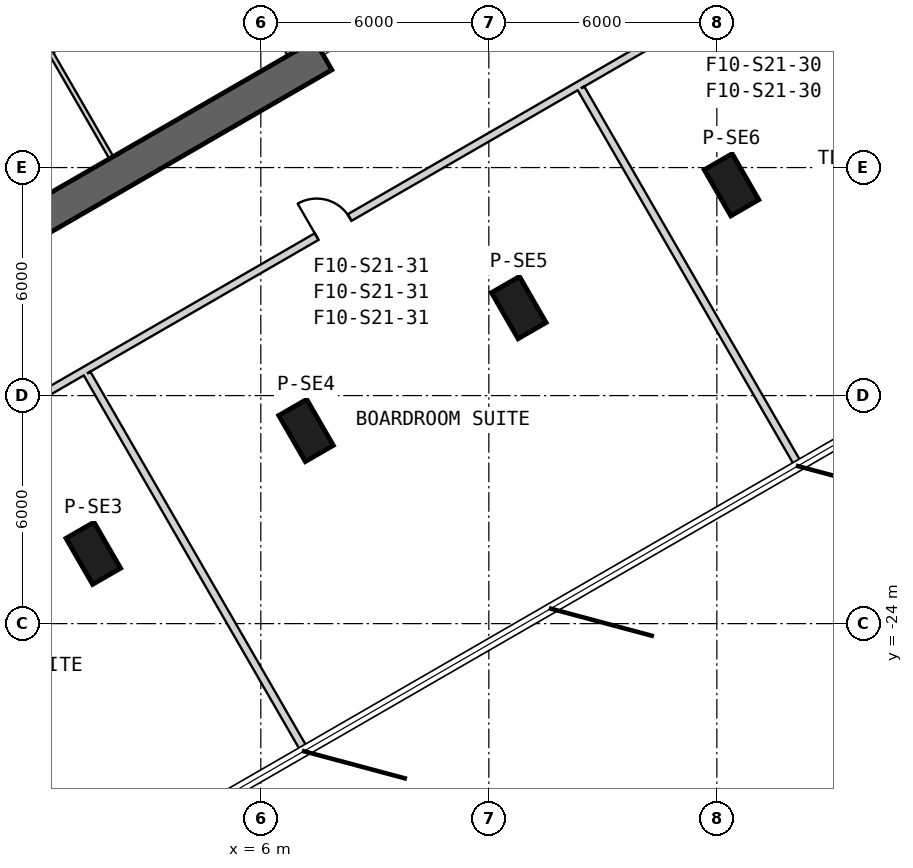
"""IFC4 building model, lengths in metres.
Left out: names, types, materials, properties, quantities, classifications, styles, units other than length and angle.
Written with IfcOpenShell. Run it as: python <this file> out.ifc"""

import sys

from ifc_helpers import new_model, si_unit, direction, frame, frame_2d, origin, origin_2d, place, context, subcontext, project, spatial, rectangle, extrude, element, fill, save


model = new_model("IFC4")
c1 = context("Model", 3, precision=1e-05, world=origin(), true_north=direction((0.0, 1.0)))
c2 = subcontext(c1, "Body", "Model", "MODEL_VIEW")
j1 = project(units=[si_unit("LENGTHUNIT", "METRE"), si_unit("PLANEANGLEUNIT", "RADIAN")], contexts=[c1])
p1 = place(None, origin())
s1 = spatial("IfcSite", under=j1, at=p1, CompositionType="ELEMENT")
p2 = place(p1, origin())
s2 = spatial("IfcBuilding", under=s1, at=p2, CompositionType="ELEMENT")
p3 = place(p2, frame((0.0, 0.0, 333.8)))
s3 = spatial("IfcBuildingStorey", under=s2, at=p3, CompositionType="ELEMENT", Elevation=333.8)
for number, where, z_axis, x_axis in (
    (1, (1.592, -22.149, 0.0), (0.0, 0.0, 1.0), (0.5, -0.866, 0.0)),
    (2, (7.19, -18.917, 0.0), (0.0, 0.0, 1.0), (0.5, -0.866, 0.0)),
    (3, (12.788, -15.685, 0.0), (0.0, 0.0, 1.0), (0.5, -0.866, 0.0)),
    (4, (18.386, -12.453, 0.0), (0.0, 0.0, 1.0), (0.5, -0.866, 0.0)),
):
    element("IfcColumn", number, at=place(p3, frame(where, z_axis=z_axis, x_axis=x_axis)), inside=s3, PredefinedType="COLUMN", context=c2, shape_type="SweptSolid", body=[
        extrude(rectangle(XDim=1.4, YDim=0.85, at=origin_2d()), origin(), (0.0, 0.0, 1.0), 3.9),
    ])
p4 = place(p3, frame((-7.825, -17.97, 0.0), z_axis=(0.0, 0.0, 1.0), x_axis=(0.866028369851, 0.499994862586, 0.0)))
e5 = element("IfcWall", 5, at=p4, inside=s3, PredefinedType="SHEAR", context=c2, shape_type="SweptSolid", body=[
    extrude(rectangle(XDim=31.523, YDim=0.9, at=frame_2d((15.762, 0.0))), origin(), (0.0, 0.0, 1.0), 3.9),
])
p5 = place(p4, frame((17.862, 0.0, 0.0)))
e6 = element("IfcOpeningElement", 6, at=p5, cuts=e5, PredefinedType="OPENING", context=c2, shape_type="SweptSolid", body=[
    extrude(rectangle(XDim=1.2, YDim=2.4, at=frame_2d((0.6, 1.2))), frame((0.0, 0.46, 0.0), z_axis=(0.0, -1.0, 0.0), x_axis=(1.0, 0.0, 0.0)), (0.0, 0.0, 1.0), 0.92),
])
p6 = place(p4, frame((20.562, 0.0, 0.0)))
e7 = element("IfcOpeningElement", 7, at=p6, cuts=e5, PredefinedType="OPENING", context=c2, shape_type="SweptSolid", body=[
    extrude(rectangle(XDim=1.2, YDim=2.4, at=frame_2d((0.6, 1.2))), frame((0.0, 0.46, 0.0), z_axis=(0.0, -1.0, 0.0), x_axis=(1.0, 0.0, 0.0)), (0.0, 0.0, 1.0), 0.92),
])
p7 = place(p4, frame((26.712, 0.0, 0.0)))
e8 = element("IfcOpeningElement", 8, at=p7, cuts=e5, PredefinedType="OPENING", context=c2, shape_type="SweptSolid", body=[
    extrude(rectangle(XDim=1.2, YDim=2.4, at=frame_2d((0.6, 1.2))), frame((0.0, 0.46, 0.0), z_axis=(0.0, -1.0, 0.0), x_axis=(1.0, 0.0, 0.0)), (0.0, 0.0, 1.0), 0.92),
])
p8 = place(p4, frame((3.612, 0.0, 0.0)))
e9 = element("IfcOpeningElement", 9, at=p8, cuts=e5, PredefinedType="OPENING", context=c2, shape_type="SweptSolid", body=[
    extrude(rectangle(XDim=1.2, YDim=2.4, at=frame_2d((0.6, 1.2))), frame((0.0, 0.46, 0.0), z_axis=(0.0, -1.0, 0.0), x_axis=(1.0, 0.0, 0.0)), (0.0, 0.0, 1.0), 0.92),
])
p9 = place(p3, frame((6.795, -9.01, 0.0), z_axis=(0.0, 0.0, 1.0), x_axis=(-0.499984717929, 0.866034226713, 0.0)))
e10 = element("IfcWall", 10, at=p9, inside=s3, PredefinedType="PLUMBINGWALL", context=c2, shape_type="SweptSolid", body=[
    extrude(rectangle(XDim=3.25, YDim=0.2, at=frame_2d((1.625, 0.0))), origin(), (0.0, 0.0, 1.0), 3.6),
])
p10 = place(p3, frame((2.067, -11.74, 0.0), z_axis=(0.0, 0.0, 1.0), x_axis=(-0.499984717929, 0.866034226713, 0.0)))
e11 = element("IfcWall", 11, at=p10, inside=s3, PredefinedType="PARTITIONING", context=c2, shape_type="SweptSolid", body=[
    extrude(rectangle(XDim=3.25, YDim=0.12, at=frame_2d((1.625, 0.0))), origin(), (0.0, 0.0, 1.0), 3.6),
])
p11 = place(p3, frame((0.483, -8.936, 0.0), z_axis=(0.0, 0.0, 1.0), x_axis=(0.866028230842, 0.499995103361, 0.0)))
e12 = element("IfcWall", 12, at=p11, inside=s3, PredefinedType="PARTITIONING", context=c2, shape_type="SweptSolid", body=[
    extrude(rectangle(XDim=5.4, YDim=0.12, at=frame_2d((2.7, 0.0))), origin(), (0.0, 0.0, 1.0), 3.6),
])
p12 = place(p11, frame((2.3, 0.0, 0.0)))
e13 = element("IfcOpeningElement", 13, at=p12, cuts=e12, PredefinedType="OPENING", context=c2, shape_type="SweptSolid", body=[
    extrude(rectangle(XDim=0.8, YDim=2.1, at=frame_2d((0.4, 1.05))), frame((0.0, 0.07, 0.0), z_axis=(0.0, -1.0, 0.0), x_axis=(1.0, 0.0, 0.0)), (0.0, 0.0, 1.0), 0.14),
])
p13 = place(p3, frame((-6.505, -21.885, 0.0), z_axis=(0.0, 0.0, 1.0), x_axis=(0.86602457258, 0.500001439686, 0.0)))
e14 = element("IfcWall", 14, at=p13, inside=s3, PredefinedType="PARTITIONING", context=c2, shape_type="SweptSolid", body=[
    extrude(rectangle(XDim=32.952, YDim=0.2, at=frame_2d((16.476, 0.0))), origin(), (0.0, 0.0, 1.0), 2.97),
])
p14 = place(p13, frame((28.061, 0.0, 0.0)))
e15 = element("IfcOpeningElement", 15, at=p14, cuts=e14, PredefinedType="OPENING", context=c2, shape_type="SweptSolid", body=[
    extrude(rectangle(XDim=1.0, YDim=2.1, at=frame_2d((0.5, 1.05))), frame((0.0, 0.11, 0.0), z_axis=(0.0, -1.0, 0.0), x_axis=(1.0, 0.0, 0.0)), (0.0, 0.0, 1.0), 0.22),
])
p15 = place(p13, frame((16.137, 0.0, 0.0)))
e16 = element("IfcOpeningElement", 16, at=p15, cuts=e14, PredefinedType="OPENING", context=c2, shape_type="SweptSolid", body=[
    extrude(rectangle(XDim=1.0, YDim=2.1, at=frame_2d((0.5, 1.05))), frame((0.0, 0.11, 0.0), z_axis=(0.0, -1.0, 0.0), x_axis=(1.0, 0.0, 0.0)), (0.0, 0.0, 1.0), 0.22),
])
p16 = place(p13, frame((4.101, 0.0, 0.0)))
e17 = element("IfcOpeningElement", 17, at=p16, cuts=e14, PredefinedType="OPENING", context=c2, shape_type="SweptSolid", body=[
    extrude(rectangle(XDim=1.0, YDim=2.1, at=frame_2d((0.5, 1.05))), frame((0.0, 0.11, 0.0), z_axis=(0.0, -1.0, 0.0), x_axis=(1.0, 0.0, 0.0)), (0.0, 0.0, 1.0), 0.22),
])
p17 = place(p3, frame((14.425, -9.916, 0.0), z_axis=(0.0, 0.0, 1.0), x_axis=(0.499943167381, -0.866058213626, 0.0)))
e18 = element("IfcWall", 18, at=p17, inside=s3, PredefinedType="PARTITIONING", context=c2, shape_type="SweptSolid", body=[
    extrude(rectangle(XDim=11.458, YDim=0.2, at=frame_2d((5.729, 0.0))), origin(), (0.0, 0.0, 1.0), 3.07),
])
p18 = place(p3, frame((7.156, -27.343, 0.0), z_axis=(0.0, 0.0, 1.0), x_axis=(-0.499948106888, 0.866055362214, 0.0)))
e19 = element("IfcWall", 19, at=p18, inside=s3, PredefinedType="PARTITIONING", context=c2, shape_type="SweptSolid", body=[
    extrude(rectangle(XDim=11.457, YDim=0.2, at=frame_2d((5.729, 0.0))), origin(), (0.0, 0.0, 1.0), 3.6),
])
p19 = place(p15, origin())
e20 = element("IfcDoor", 20, at=p19, inside=s3, OperationType="SINGLE_SWING_RIGHT", PredefinedType="USERDEFINED", context=c2, shape_type="SweptSolid", body=[
    extrude(rectangle(XDim=1.0, YDim=2.1, at=frame_2d((0.5, 1.05))), frame((0.0, 0.025, 0.0), z_axis=(0.0, -1.0, 0.0), x_axis=(1.0, 0.0, 0.0)), (0.0, 0.0, 1.0), 0.05),
])
fill(e16, e20)
p20 = place(p5, origin())
e21 = element("IfcDoor", 21, at=p20, inside=s3, OperationType="SLIDING_TO_LEFT", PredefinedType="USERDEFINED", context=c2, shape_type="SweptSolid", body=[
    extrude(rectangle(XDim=1.2, YDim=2.4, at=frame_2d((0.6, 1.2))), frame((0.0, 0.025, 0.0), z_axis=(0.0, -1.0, 0.0), x_axis=(1.0, 0.0, 0.0)), (0.0, 0.0, 1.0), 0.05),
])
fill(e6, e21)
save(model, sys.argv[1])
